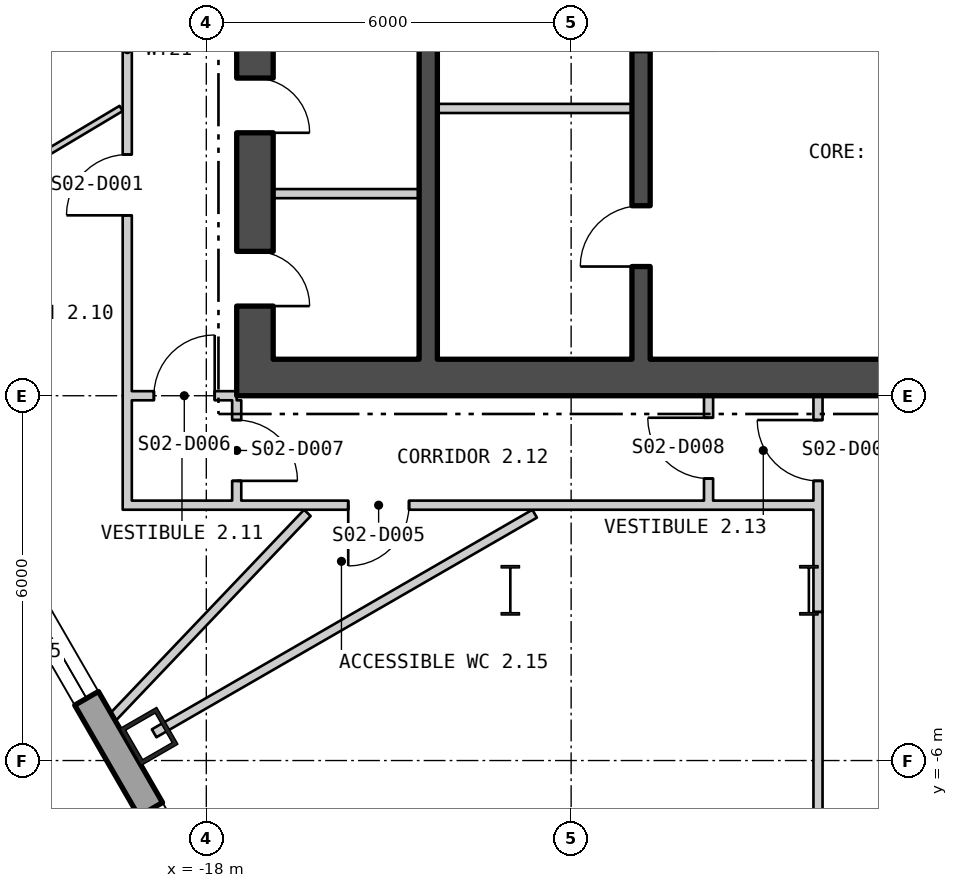
"""IFC4 building model, lengths in metres.
Left out: names, types, materials, properties, quantities, classifications, styles, units other than length and angle.
Written with IfcOpenShell. Run it as: python <this file> out.ifc"""

import sys

from ifc_helpers import new_model, si_unit, direction, frame, frame_2d, origin, origin_2d, place, context, subcontext, project, spatial, polyline, rectangle, hollow_rectangle, i_section, outline, extrude, element, fill, save


model = new_model("IFC4")
c1 = context("Model", 3, precision=1e-05, world=origin(), true_north=direction((0.0, 1.0)))
c2 = subcontext(c1, "Body", "Model", "MODEL_VIEW")
j1 = project(units=[si_unit("LENGTHUNIT", "METRE"), si_unit("PLANEANGLEUNIT", "RADIAN")], contexts=[c1])
p1 = place(None, origin())
s1 = spatial("IfcSite", under=j1, at=p1, CompositionType="ELEMENT")
p2 = place(p1, origin())
s2 = spatial("IfcBuilding", under=s1, at=p2, CompositionType="ELEMENT")
p3 = place(p2, frame((0.0, 0.0, 33.3)))
s3 = spatial("IfcBuildingStorey", under=s2, at=p3, CompositionType="ELEMENT", Elevation=33.3)
p4 = place(p3, frame((-18.944, -5.603, 0.0), z_axis=(0.0, 0.0, 1.0), x_axis=(0.5, -0.866025403784, 0.0)))
e1 = element("IfcColumn", 1, at=p4, inside=s3, PredefinedType="COLUMN", context=c2, shape_type="SweptSolid", body=[
    extrude(hollow_rectangle(XDim=0.7, YDim=0.7, WallThickness=0.07, at=origin_2d()), origin(), (0.0, 0.0, 1.0), 4.5),
])
for number, where, z_axis, x_axis in (
    (2, (-8.09, -3.2, 0.0), (0.0, 0.0, 1.0), (1.0, 0.0, 0.0)),
    (3, (-13.0, -3.2, 0.0), (0.0, 0.0, 1.0), (1.0, 0.0, 0.0)),
):
    element("IfcColumn", number, at=place(p3, frame(where, z_axis=z_axis, x_axis=x_axis)), inside=s3, PredefinedType="COLUMN", context=c2, shape_type="SweptSolid", body=[
        extrude(i_section(OverallWidth=0.303, OverallDepth=0.814, WebThickness=0.021, FlangeThickness=0.04, at=origin_2d()), origin(), (0.0, 0.0, 1.0), 4.5),
    ])
p5 = place(p3, frame((-28.625, 10.015, -0.18), z_axis=(0.0, 0.0, 1.0), x_axis=(0.500000335318, -0.866025210188, 0.0)))
e4 = element("IfcWall", 4, at=p5, inside=s3, PredefinedType="SOLIDWALL", context=c2, shape_type="SweptSolid", body=[
    extrude(outline(polyline([(-0.13, -0.225), (45.88, -0.225), (45.62, 0.225), (0.13, 0.225), (-0.13, -0.225)])), origin(), (0.0, 0.0, 1.0), 4.28),
])
p6 = place(p5, frame((1.425, 0.0, 1.08)))
e5 = element("IfcOpeningElement", 5, at=p6, cuts=e4, PredefinedType="OPENING", context=c2, shape_type="SweptSolid", body=[
    extrude(rectangle(XDim=2.4, YDim=2.6, at=frame_2d((1.2, 1.3))), frame((0.0, 0.235, 0.0), z_axis=(0.0, -1.0, 0.0), x_axis=(1.0, 0.0, 0.0)), (0.0, 0.0, 1.0), 0.47),
])
p7 = place(p5, frame((5.895, 0.0, 1.08)))
e6 = element("IfcOpeningElement", 6, at=p7, cuts=e4, PredefinedType="OPENING", context=c2, shape_type="SweptSolid", body=[
    extrude(rectangle(XDim=2.4, YDim=2.6, at=frame_2d((1.2, 1.3))), frame((0.0, 0.235, 0.0), z_axis=(0.0, -1.0, 0.0), x_axis=(1.0, 0.0, 0.0)), (0.0, 0.0, 1.0), 0.47),
])
p8 = place(p5, frame((10.403, 0.0, 1.08)))
e7 = element("IfcOpeningElement", 7, at=p8, cuts=e4, PredefinedType="OPENING", context=c2, shape_type="SweptSolid", body=[
    extrude(rectangle(XDim=2.4, YDim=2.6, at=frame_2d((1.2, 1.3))), frame((0.0, 0.235, 0.0), z_axis=(0.0, -1.0, 0.0), x_axis=(1.0, 0.0, 0.0)), (0.0, 0.0, 1.0), 0.47),
])
p9 = place(p5, frame((14.912, 0.0, 1.08)))
e8 = element("IfcOpeningElement", 8, at=p9, cuts=e4, PredefinedType="OPENING", context=c2, shape_type="SweptSolid", body=[
    extrude(rectangle(XDim=2.4, YDim=2.6, at=frame_2d((1.2, 1.3))), frame((0.0, 0.235, 0.0), z_axis=(0.0, -1.0, 0.0), x_axis=(1.0, 0.0, 0.0)), (0.0, 0.0, 1.0), 0.47),
])
p10 = place(p5, frame((19.421, 0.0, 1.08)))
e9 = element("IfcOpeningElement", 9, at=p10, cuts=e4, PredefinedType="OPENING", context=c2, shape_type="SweptSolid", body=[
    extrude(rectangle(XDim=2.4, YDim=2.6, at=frame_2d((1.2, 1.3))), frame((0.0, 0.235, 0.0), z_axis=(0.0, -1.0, 0.0), x_axis=(1.0, 0.0, 0.0)), (0.0, 0.0, 1.0), 0.47),
])
p11 = place(p5, frame((23.929, 0.0, 1.08)))
e10 = element("IfcOpeningElement", 10, at=p11, cuts=e4, PredefinedType="OPENING", context=c2, shape_type="SweptSolid", body=[
    extrude(rectangle(XDim=2.4, YDim=2.6, at=frame_2d((1.2, 1.3))), frame((0.0, 0.235, 0.0), z_axis=(0.0, -1.0, 0.0), x_axis=(1.0, 0.0, 0.0)), (0.0, 0.0, 1.0), 0.47),
])
p12 = place(p5, frame((28.438, 0.0, 1.08)))
e11 = element("IfcOpeningElement", 11, at=p12, cuts=e4, PredefinedType="OPENING", context=c2, shape_type="SweptSolid", body=[
    extrude(rectangle(XDim=2.4, YDim=2.6, at=frame_2d((1.2, 1.3))), frame((0.0, 0.235, 0.0), z_axis=(0.0, -1.0, 0.0), x_axis=(1.0, 0.0, 0.0)), (0.0, 0.0, 1.0), 0.47),
])
p13 = place(p5, frame((32.947, 0.0, 1.08)))
e12 = element("IfcOpeningElement", 12, at=p13, cuts=e4, PredefinedType="OPENING", context=c2, shape_type="SweptSolid", body=[
    extrude(rectangle(XDim=2.4, YDim=2.6, at=frame_2d((1.2, 1.3))), frame((0.0, 0.235, 0.0), z_axis=(0.0, -1.0, 0.0), x_axis=(1.0, 0.0, 0.0)), (0.0, 0.0, 1.0), 0.47),
])
p14 = place(p5, frame((37.455, 0.0, 1.08)))
e13 = element("IfcOpeningElement", 13, at=p14, cuts=e4, PredefinedType="OPENING", context=c2, shape_type="SweptSolid", body=[
    extrude(rectangle(XDim=2.4, YDim=2.6, at=frame_2d((1.2, 1.3))), frame((0.0, 0.235, 0.0), z_axis=(0.0, -1.0, 0.0), x_axis=(1.0, 0.0, 0.0)), (0.0, 0.0, 1.0), 0.47),
])
p15 = place(p5, frame((41.925, 0.0, 1.08)))
e14 = element("IfcOpeningElement", 14, at=p15, cuts=e4, PredefinedType="OPENING", context=c2, shape_type="SweptSolid", body=[
    extrude(rectangle(XDim=2.4, YDim=2.6, at=frame_2d((1.2, 1.3))), frame((0.0, 0.235, 0.0), z_axis=(0.0, -1.0, 0.0), x_axis=(1.0, 0.0, 0.0)), (0.0, 0.0, 1.0), 0.47),
])
p16 = place(p3, frame((-17.5, 0.3, 0.0), z_axis=(0.0, 0.0, 1.0), x_axis=(1.0, 0.0, 0.0)))
e15 = element("IfcWall", 15, at=p16, inside=s3, PredefinedType="SHEAR", context=c2, shape_type="SweptSolid", body=[
    extrude(rectangle(XDim=35.0, YDim=0.6, at=frame_2d((17.5, 0.0))), origin(), (0.0, 0.0, 1.0), 4.3),
])
p17 = place(p16, frame((12.0, 0.0, 0.0)))
e16 = element("IfcOpeningElement", 16, at=p17, cuts=e15, PredefinedType="OPENING", context=c2, shape_type="SweptSolid", body=[
    extrude(rectangle(XDim=1.8, YDim=2.4, at=frame_2d((0.9, 1.2))), frame((0.0, 0.31, 0.0), z_axis=(0.0, -1.0, 0.0), x_axis=(1.0, 0.0, 0.0)), (0.0, 0.0, 1.0), 0.62),
])
p18 = place(p16, frame((22.0, 0.0, 0.0)))
e17 = element("IfcOpeningElement", 17, at=p18, cuts=e15, PredefinedType="OPENING", context=c2, shape_type="SweptSolid", body=[
    extrude(rectangle(XDim=1.8, YDim=2.4, at=frame_2d((0.9, 1.2))), frame((0.0, 0.31, 0.0), z_axis=(0.0, -1.0, 0.0), x_axis=(1.0, 0.0, 0.0)), (0.0, 0.0, 1.0), 0.62),
])
p19 = place(p3, frame((-17.2, 0.6, 0.0), z_axis=(0.0, 0.0, 1.0), x_axis=(0.0, 1.0, 0.0)))
e18 = element("IfcWall", 18, at=p19, inside=s3, PredefinedType="SHEAR", context=c2, shape_type="SweptSolid", body=[
    extrude(rectangle(XDim=16.8, YDim=0.6, at=frame_2d((8.4, 0.0))), origin(), (0.0, 0.0, 1.0), 4.3),
])
p20 = place(p19, frame((5.7, 0.0, 0.0)))
e19 = element("IfcOpeningElement", 19, at=p20, cuts=e18, PredefinedType="OPENING", context=c2, shape_type="SweptSolid", body=[
    extrude(rectangle(XDim=1.5, YDim=2.1, at=frame_2d((0.75, 1.05))), frame((0.0, 0.31, 0.0), z_axis=(0.0, -1.0, 0.0), x_axis=(1.0, 0.0, 0.0)), (0.0, 0.0, 1.0), 0.62),
])
p21 = place(p19, frame((0.875, 0.0, 0.0)))
e20 = element("IfcOpeningElement", 20, at=p21, cuts=e18, PredefinedType="OPENING", context=c2, shape_type="SweptSolid", body=[
    extrude(rectangle(XDim=0.9, YDim=2.1, at=frame_2d((0.45, 1.05))), frame((0.0, 0.31, 0.0), z_axis=(0.0, -1.0, 0.0), x_axis=(1.0, 0.0, 0.0)), (0.0, 0.0, 1.0), 0.62),
])
p22 = place(p19, frame((3.724, 0.0, 0.0)))
e21 = element("IfcOpeningElement", 21, at=p22, cuts=e18, PredefinedType="OPENING", context=c2, shape_type="SweptSolid", body=[
    extrude(rectangle(XDim=0.9, YDim=2.1, at=frame_2d((0.45, 1.05))), frame((0.0, 0.31, 0.0), z_axis=(0.0, -1.0, 0.0), x_axis=(1.0, 0.0, 0.0)), (0.0, 0.0, 1.0), 0.62),
])
p23 = place(p19, frame((8.115, 0.0, 0.0)))
e22 = element("IfcOpeningElement", 22, at=p23, cuts=e18, PredefinedType="OPENING", context=c2, shape_type="SweptSolid", body=[
    extrude(rectangle(XDim=1.0, YDim=2.1, at=frame_2d((0.5, 1.05))), frame((0.0, 0.31, 0.0), z_axis=(0.0, -1.0, 0.0), x_axis=(1.0, 0.0, 0.0)), (0.0, 0.0, 1.0), 0.62),
])
p24 = place(p19, frame((11.528, 0.0, 0.0)))
e23 = element("IfcOpeningElement", 23, at=p24, cuts=e18, PredefinedType="OPENING", context=c2, shape_type="SweptSolid", body=[
    extrude(rectangle(XDim=0.9, YDim=2.1, at=frame_2d((0.45, 1.05))), frame((0.0, 0.31, 0.0), z_axis=(0.0, -1.0, 0.0), x_axis=(1.0, 0.0, 0.0)), (0.0, 0.0, 1.0), 0.62),
])
p25 = place(p19, frame((14.987, 0.0, 0.0)))
e24 = element("IfcOpeningElement", 24, at=p25, cuts=e18, PredefinedType="OPENING", context=c2, shape_type="SweptSolid", body=[
    extrude(rectangle(XDim=0.9, YDim=2.1, at=frame_2d((0.45, 1.05))), frame((0.0, 0.31, 0.0), z_axis=(0.0, -1.0, 0.0), x_axis=(1.0, 0.0, 0.0)), (0.0, 0.0, 1.0), 0.62),
])
p26 = place(p3, frame((-10.85, 0.6, 0.0), z_axis=(0.0, 0.0, 1.0), x_axis=(0.0, 1.0, 0.0)))
e25 = element("IfcWall", 25, at=p26, inside=s3, PredefinedType="SHEAR", context=c2, shape_type="SweptSolid", body=[
    extrude(rectangle(XDim=16.8, YDim=0.3, at=frame_2d((8.4, 0.0))), origin(), (0.0, 0.0, 1.0), 4.3),
])
p27 = place(p26, frame((5.075, 0.0, 0.0)))
e26 = element("IfcOpeningElement", 26, at=p27, cuts=e25, PredefinedType="OPENING", context=c2, shape_type="SweptSolid", body=[
    extrude(rectangle(XDim=1.25, YDim=2.1, at=frame_2d((0.625, 1.05))), frame((0.0, 0.16, 0.0), z_axis=(0.0, -1.0, 0.0), x_axis=(1.0, 0.0, 0.0)), (0.0, 0.0, 1.0), 0.32),
])
p28 = place(p26, frame((1.525, 0.0, 0.0)))
e27 = element("IfcOpeningElement", 27, at=p28, cuts=e25, PredefinedType="OPENING", context=c2, shape_type="SweptSolid", body=[
    extrude(rectangle(XDim=1.0, YDim=2.1, at=frame_2d((0.5, 1.05))), frame((0.0, 0.16, 0.0), z_axis=(0.0, -1.0, 0.0), x_axis=(1.0, 0.0, 0.0)), (0.0, 0.0, 1.0), 0.32),
])
p29 = place(p3, frame((-14.35, 0.6, 0.0), z_axis=(0.0, 0.0, 1.0), x_axis=(0.0, 1.0, 0.0)))
e28 = element("IfcWall", 28, at=p29, inside=s3, PredefinedType="SHEAR", context=c2, shape_type="SweptSolid", body=[
    extrude(rectangle(XDim=16.8, YDim=0.3, at=frame_2d((8.4, 0.0))), origin(), (0.0, 0.0, 1.0), 4.3),
])
p30 = place(p29, frame((5.7, 0.0, 0.0)))
e29 = element("IfcOpeningElement", 29, at=p30, cuts=e28, PredefinedType="OPENING", context=c2, shape_type="SweptSolid", body=[
    extrude(rectangle(XDim=1.5, YDim=2.1, at=frame_2d((0.75, 1.05))), frame((0.0, 0.16, 0.0), z_axis=(0.0, -1.0, 0.0), x_axis=(1.0, 0.0, 0.0)), (0.0, 0.0, 1.0), 0.32),
])
p31 = place(p3, frame((-14.2, 4.725, 0.0), z_axis=(0.0, 0.0, 1.0), x_axis=(1.0, 0.0, 0.0)))
e30 = element("IfcWall", 30, at=p31, inside=s3, PredefinedType="PARTITIONING", context=c2, shape_type="SweptSolid", body=[
    extrude(rectangle(XDim=3.2, YDim=0.15, at=frame_2d((1.6, 0.0))), origin(), (0.0, 0.0, 1.0), 4.3),
])
p32 = place(p3, frame((-16.9, 3.324, 0.0), z_axis=(0.0, 0.0, 1.0), x_axis=(1.0, 0.0, 0.0)))
e31 = element("IfcWall", 31, at=p32, inside=s3, PredefinedType="PARTITIONING", context=c2, shape_type="SweptSolid", body=[
    extrude(rectangle(XDim=2.4, YDim=0.15, at=frame_2d((1.2, 0.0))), origin(), (0.0, 0.0, 1.0), 4.3),
])
p33 = place(p3, frame((-23.41, 2.331, 0.0), z_axis=(0.0, 0.0, 1.0), x_axis=(0.858568146325, 0.512699461786, 0.0)))
e32 = element("IfcWall", 32, at=p33, inside=s3, PredefinedType="PARTITIONING", context=c2, shape_type="SweptSolid", body=[
    extrude(rectangle(XDim=4.669, YDim=0.1, at=frame_2d((2.335, 0.0))), origin(), (0.0, 0.0, 1.0), 4.3),
])
p34 = place(p3, frame((-19.533, -5.282, 0.0), z_axis=(0.0, 0.0, 1.0), x_axis=(0.689628223258, 0.724163595941, 0.0)))
e33 = element("IfcWall", 33, at=p34, inside=s3, PredefinedType="PARTITIONING", context=c2, shape_type="SweptSolid", body=[
    extrude(rectangle(XDim=4.633, YDim=0.15, at=frame_2d((2.316, 0.0))), origin(), (0.0, 0.0, 1.0), 4.3),
])
p35 = place(p3, frame((-19.3, -1.875, 0.0), z_axis=(0.0, 0.0, 1.0), x_axis=(0.0, 1.0, 0.0)))
e34 = element("IfcWall", 34, at=p35, inside=s3, PredefinedType="PARTITIONING", context=c2, shape_type="SweptSolid", body=[
    extrude(rectangle(XDim=15.133, YDim=0.15, at=frame_2d((7.566, 0.0))), origin(), (0.0, 0.0, 1.0), 4.3),
])
p36 = place(p35, frame((4.842, 0.0, 0.0)))
e35 = element("IfcOpeningElement", 35, at=p36, cuts=e34, PredefinedType="OPENING", context=c2, shape_type="SweptSolid", body=[
    extrude(rectangle(XDim=1.0, YDim=2.1, at=frame_2d((0.5, 1.05))), frame((0.0, 0.085, 0.0), z_axis=(0.0, -1.0, 0.0), x_axis=(1.0, 0.0, 0.0)), (0.0, 0.0, 1.0), 0.17),
])
p37 = place(p35, frame((8.671, 0.0, 0.0)))
e36 = element("IfcOpeningElement", 36, at=p37, cuts=e34, PredefinedType="OPENING", context=c2, shape_type="SweptSolid", body=[
    extrude(rectangle(XDim=1.0, YDim=2.1, at=frame_2d((0.5, 1.05))), frame((0.0, 0.085, 0.0), z_axis=(0.0, -1.0, 0.0), x_axis=(1.0, 0.0, 0.0)), (0.0, 0.0, 1.0), 0.17),
])
p38 = place(p35, frame((12.857, 0.0, 0.0)))
e37 = element("IfcOpeningElement", 37, at=p38, cuts=e34, PredefinedType="OPENING", context=c2, shape_type="SweptSolid", body=[
    extrude(rectangle(XDim=1.0, YDim=2.1, at=frame_2d((0.5, 1.05))), frame((0.0, 0.085, 0.0), z_axis=(0.0, -1.0, 0.0), x_axis=(1.0, 0.0, 0.0)), (0.0, 0.0, 1.0), 0.17),
])
p39 = place(p3, frame((-19.225, -1.8, 0.0), z_axis=(0.0, 0.0, 1.0), x_axis=(1.0, 0.0, 0.0)))
e38 = element("IfcWall", 38, at=p39, inside=s3, PredefinedType="PARTITIONING", context=c2, shape_type="SweptSolid", body=[
    extrude(rectangle(XDim=11.21, YDim=0.15, at=frame_2d((5.605, 0.0))), origin(), (0.0, 0.0, 1.0), 4.3),
])
p40 = place(p39, frame((3.559, 0.0, 0.0)))
e39 = element("IfcOpeningElement", 39, at=p40, cuts=e38, PredefinedType="OPENING", context=c2, shape_type="SweptSolid", body=[
    extrude(rectangle(XDim=1.0, YDim=2.1, at=frame_2d((0.5, 1.05))), frame((0.0, 0.085, 0.0), z_axis=(0.0, -1.0, 0.0), x_axis=(1.0, 0.0, 0.0)), (0.0, 0.0, 1.0), 0.17),
])
p41 = place(p3, frame((-19.225, 0.0, 0.0), z_axis=(0.0, 0.0, 1.0), x_axis=(1.0, 0.0, 0.0)))
e40 = element("IfcWall", 40, at=p41, inside=s3, PredefinedType="PARTITIONING", context=c2, shape_type="SweptSolid", body=[
    extrude(rectangle(XDim=1.725, YDim=0.15, at=frame_2d((0.863, 0.0))), origin(), (0.0, 0.0, 1.0), 3.61),
])
p42 = place(p41, frame((0.363, 0.0, 0.0)))
e41 = element("IfcOpeningElement", 41, at=p42, cuts=e40, PredefinedType="OPENING", context=c2, shape_type="SweptSolid", body=[
    extrude(rectangle(XDim=1.0, YDim=2.1, at=frame_2d((0.5, 1.05))), frame((0.0, 0.085, 0.0), z_axis=(0.0, -1.0, 0.0), x_axis=(1.0, 0.0, 0.0)), (0.0, 0.0, 1.0), 0.17),
])
p43 = place(p3, frame((-18.858, -5.552, 0.0), z_axis=(0.0, 0.0, 1.0), x_axis=(0.866088799389, 0.499890179513, 0.0)))
e42 = element("IfcWall", 42, at=p43, inside=s3, PredefinedType="PARTITIONING", context=c2, shape_type="SweptSolid", body=[
    extrude(rectangle(XDim=7.226, YDim=0.15, at=frame_2d((3.613, 0.0))), origin(), (0.0, 0.0, 1.0), 4.3),
])
p44 = place(p3, frame((-17.5, -1.725, 0.0), z_axis=(0.0, 0.0, 1.0), x_axis=(0.0, 1.0, 0.0)))
e43 = element("IfcWall", 43, at=p44, inside=s3, PredefinedType="PARTITIONING", context=c2, shape_type="SweptSolid", body=[
    extrude(rectangle(XDim=1.65, YDim=0.15, at=frame_2d((0.825, 0.0))), origin(), (0.0, 0.0, 1.0), 4.3),
])
p45 = place(p44, frame((0.325, 0.0, 0.0)))
e44 = element("IfcOpeningElement", 44, at=p45, cuts=e43, PredefinedType="OPENING", context=c2, shape_type="SweptSolid", body=[
    extrude(rectangle(XDim=1.0, YDim=2.1, at=frame_2d((0.5, 1.05))), frame((0.0, 0.085, 0.0), z_axis=(0.0, -1.0, 0.0), x_axis=(1.0, 0.0, 0.0)), (0.0, 0.0, 1.0), 0.17),
])
p46 = place(p3, frame((-9.74, -1.725, 0.0), z_axis=(0.0, 0.0, 1.0), x_axis=(0.0, 1.0, 0.0)))
e45 = element("IfcWall", 45, at=p46, inside=s3, PredefinedType="PARTITIONING", context=c2, shape_type="SweptSolid", body=[
    extrude(rectangle(XDim=1.725, YDim=0.15, at=frame_2d((0.863, 0.0))), origin(), (0.0, 0.0, 1.0), 4.3),
])
p47 = place(p46, frame((0.363, 0.0, 0.0)))
e46 = element("IfcOpeningElement", 46, at=p47, cuts=e45, PredefinedType="OPENING", context=c2, shape_type="SweptSolid", body=[
    extrude(rectangle(XDim=1.0, YDim=2.1, at=frame_2d((0.5, 1.05))), frame((0.0, 0.085, 0.0), z_axis=(0.0, -1.0, 0.0), x_axis=(1.0, 0.0, 0.0)), (0.0, 0.0, 1.0), 0.17),
])
p48 = place(p3, frame((-7.94, -13.675, 0.0), z_axis=(0.0, 0.0, 1.0), x_axis=(0.0, 1.0, 0.0)))
e47 = element("IfcWall", 47, at=p48, inside=s3, PredefinedType="PARTITIONING", context=c2, shape_type="SweptSolid", body=[
    extrude(rectangle(XDim=10.118, YDim=0.15, at=frame_2d((5.059, 0.0))), origin(), (0.0, 0.0, 1.0), 3.61),
])
p49 = place(p3, frame((-7.94, -3.557, 0.0), z_axis=(0.0, 0.0, 1.0), x_axis=(0.0, 1.0, 0.0)))
e48 = element("IfcWall", 48, at=p49, inside=s3, PredefinedType="PARTITIONING", context=c2, shape_type="SweptSolid", body=[
    extrude(rectangle(XDim=3.557, YDim=0.15, at=frame_2d((1.778, 0.0))), origin(), (0.0, 0.0, 1.0), 4.3),
])
p50 = place(p49, frame((2.157, 0.0, 0.0)))
e49 = element("IfcOpeningElement", 49, at=p50, cuts=e48, PredefinedType="OPENING", context=c2, shape_type="SweptSolid", body=[
    extrude(rectangle(XDim=1.0, YDim=2.1, at=frame_2d((0.5, 1.05))), frame((0.0, 0.085, 0.0), z_axis=(0.0, -1.0, 0.0), x_axis=(1.0, 0.0, 0.0)), (0.0, 0.0, 1.0), 0.17),
])
p51 = place(p9, origin())
e50 = element("IfcWindow", 50, at=p51, inside=s3, PartitioningType="SINGLE_PANEL", PredefinedType="WINDOW", context=c2, shape_type="SweptSolid", body=[
    extrude(rectangle(XDim=2.4, YDim=2.6, at=frame_2d((1.2, 1.3))), frame((0.0, 0.105, 0.0), z_axis=(0.0, -1.0, 0.0), x_axis=(1.0, 0.0, 0.0)), (0.0, 0.0, 1.0), 0.06),
])
fill(e8, e50)
p52 = place(p10, origin())
e51 = element("IfcWindow", 51, at=p52, inside=s3, PartitioningType="SINGLE_PANEL", PredefinedType="WINDOW", context=c2, shape_type="SweptSolid", body=[
    extrude(rectangle(XDim=2.4, YDim=2.6, at=frame_2d((1.2, 1.3))), frame((0.0, 0.105, 0.0), z_axis=(0.0, -1.0, 0.0), x_axis=(1.0, 0.0, 0.0)), (0.0, 0.0, 1.0), 0.06),
])
fill(e9, e51)
p53 = place(p28, origin())
e52 = element("IfcDoor", 52, at=p53, inside=s3, OperationType="SINGLE_SWING_RIGHT", PredefinedType="DOOR", context=c2, shape_type="SweptSolid", body=[
    extrude(rectangle(XDim=1.0, YDim=2.1, at=frame_2d((0.5, 1.05))), frame((0.0, 0.025, 0.0), z_axis=(0.0, -1.0, 0.0), x_axis=(1.0, 0.0, 0.0)), (0.0, 0.0, 1.0), 0.05),
])
fill(e27, e52)
p54 = place(p21, origin())
e53 = element("IfcDoor", 53, at=p54, inside=s3, OperationType="SINGLE_SWING_LEFT", PredefinedType="DOOR", context=c2, shape_type="SweptSolid", body=[
    extrude(rectangle(XDim=0.9, YDim=2.1, at=frame_2d((0.45, 1.05))), frame((0.0, 0.025, 0.0), z_axis=(0.0, -1.0, 0.0), x_axis=(1.0, 0.0, 0.0)), (0.0, 0.0, 1.0), 0.05),
])
fill(e20, e53)
p55 = place(p22, origin())
e54 = element("IfcDoor", 54, at=p55, inside=s3, OperationType="SINGLE_SWING_LEFT", PredefinedType="DOOR", context=c2, shape_type="SweptSolid", body=[
    extrude(rectangle(XDim=0.9, YDim=2.1, at=frame_2d((0.45, 1.05))), frame((0.0, 0.025, 0.0), z_axis=(0.0, -1.0, 0.0), x_axis=(1.0, 0.0, 0.0)), (0.0, 0.0, 1.0), 0.05),
])
fill(e21, e54)
p56 = place(p36, origin())
e55 = element("IfcDoor", 55, at=p56, inside=s3, OperationType="SINGLE_SWING_RIGHT", PredefinedType="DOOR", context=c2, shape_type="SweptSolid", body=[
    extrude(rectangle(XDim=1.0, YDim=2.1, at=frame_2d((0.5, 1.05))), frame((0.0, 0.025, 0.0), z_axis=(0.0, -1.0, 0.0), x_axis=(1.0, 0.0, 0.0)), (0.0, 0.0, 1.0), 0.05),
])
fill(e35, e55)
p57 = place(p40, origin())
e56 = element("IfcDoor", 56, at=p57, inside=s3, OperationType="SINGLE_SWING_LEFT", PredefinedType="DOOR", context=c2, shape_type="SweptSolid", body=[
    extrude(rectangle(XDim=1.0, YDim=2.1, at=frame_2d((0.5, 1.05))), frame((0.0, 0.025, 0.0), z_axis=(0.0, -1.0, 0.0), x_axis=(1.0, 0.0, 0.0)), (0.0, 0.0, 1.0), 0.05),
])
fill(e39, e56)
p58 = place(p42, origin())
e57 = element("IfcDoor", 57, at=p58, inside=s3, OperationType="SINGLE_SWING_LEFT", PredefinedType="DOOR", context=c2, shape_type="SweptSolid", body=[
    extrude(rectangle(XDim=1.0, YDim=2.1, at=frame_2d((0.5, 1.05))), frame((0.0, 0.025, 0.0), z_axis=(0.0, -1.0, 0.0), x_axis=(1.0, 0.0, 0.0)), (0.0, 0.0, 1.0), 0.05),
])
fill(e41, e57)
p59 = place(p45, origin())
e58 = element("IfcDoor", 58, at=p59, inside=s3, OperationType="SINGLE_SWING_LEFT", PredefinedType="DOOR", context=c2, shape_type="SweptSolid", body=[
    extrude(rectangle(XDim=1.0, YDim=2.1, at=frame_2d((0.5, 1.05))), frame((0.0, 0.025, 0.0), z_axis=(0.0, -1.0, 0.0), x_axis=(1.0, 0.0, 0.0)), (0.0, 0.0, 1.0), 0.05),
])
fill(e44, e58)
p60 = place(p47, origin())
e59 = element("IfcDoor", 59, at=p60, inside=s3, OperationType="SINGLE_SWING_LEFT", PredefinedType="DOOR", context=c2, shape_type="SweptSolid", body=[
    extrude(rectangle(XDim=1.0, YDim=2.1, at=frame_2d((0.5, 1.05))), frame((0.0, 0.025, 0.0), z_axis=(0.0, -1.0, 0.0), x_axis=(1.0, 0.0, 0.0)), (0.0, 0.0, 1.0), 0.05),
])
fill(e46, e59)
p61 = place(p50, origin())
e60 = element("IfcDoor", 60, at=p61, inside=s3, OperationType="SINGLE_SWING_LEFT", PredefinedType="DOOR", context=c2, shape_type="SweptSolid", body=[
    extrude(rectangle(XDim=1.0, YDim=2.1, at=frame_2d((0.5, 1.05))), frame((0.0, 0.025, 0.0), z_axis=(0.0, -1.0, 0.0), x_axis=(1.0, 0.0, 0.0)), (0.0, 0.0, 1.0), 0.05),
])
fill(e49, e60)
save(model, sys.argv[1])
